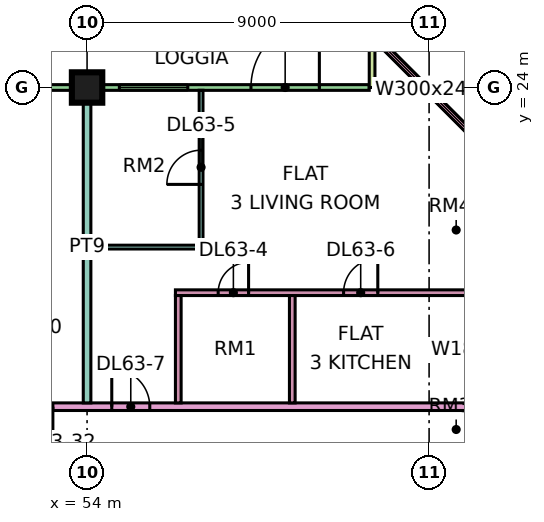
"""IFC4 building model, lengths in metres.
Left out: names, types, materials, properties, quantities, classifications, styles, units other than length and angle.
Written with IfcOpenShell. Run it as: python <this file> out.ifc"""

import sys

from ifc_helpers import new_model, si_unit, direction, frame, frame_2d, origin, origin_2d, place, context, subcontext, project, spatial, rectangle, extrude, element, fill, save


model = new_model("IFC4")
c1 = context("Model", 3, precision=1e-05, world=origin(), true_north=direction((0.0, 1.0)))
c2 = subcontext(c1, "Body", "Model", "MODEL_VIEW")
j1 = project(units=[si_unit("LENGTHUNIT", "METRE"), si_unit("PLANEANGLEUNIT", "RADIAN")], contexts=[c1])
p1 = place(None, origin())
s1 = spatial("IfcSite", under=j1, at=p1, CompositionType="ELEMENT")
p2 = place(p1, origin())
s2 = spatial("IfcBuilding", under=s1, at=p2, CompositionType="ELEMENT")
p3 = place(p2, frame((0.0, 0.0, 273.4)))
s3 = spatial("IfcBuildingStorey", under=s2, at=p3, CompositionType="ELEMENT", Elevation=273.4)
p4 = place(p3, frame((54.0, 24.0, 0.0), z_axis=(0.0, 0.0, 1.0), x_axis=(1.0, 0.0, 0.0)))
e1 = element("IfcColumn", 1, at=p4, inside=s3, PredefinedType="COLUMN", context=c2, shape_type="SweptSolid", body=[
    extrude(rectangle(XDim=0.8, YDim=0.8, at=origin_2d()), origin(), (0.0, 0.0, 1.0), 3.75),
])
p5 = place(p3, frame((61.425, 24.0, 0.0), z_axis=(0.0, 0.0, 1.0), x_axis=(-1.0, 0.0, 0.0)))
e2 = element("IfcWall", 2, at=p5, inside=s3, PredefinedType="SOLIDWALL", context=c2, shape_type="SweptSolid", body=[
    extrude(rectangle(XDim=13.35, YDim=0.15, at=frame_2d((6.675, 0.0))), origin(), (0.0, 0.0, 1.0), 3.35),
])
p6 = place(p5, frame((1.312, 0.0, 0.0)))
e3 = element("IfcOpeningElement", 3, at=p6, cuts=e2, PredefinedType="OPENING", context=c2, shape_type="SweptSolid", body=[
    extrude(rectangle(XDim=1.8, YDim=2.4, at=frame_2d((0.9, 1.2))), frame((0.0, 0.085, 0.0), z_axis=(0.0, -1.0, 0.0), x_axis=(1.0, 0.0, 0.0)), (0.0, 0.0, 1.0), 0.17),
])
p7 = place(p5, frame((4.775, 0.0, 0.45)))
e4 = element("IfcOpeningElement", 4, at=p7, cuts=e2, PredefinedType="OPENING", context=c2, shape_type="SweptSolid", body=[
    extrude(rectangle(XDim=1.8, YDim=2.4, at=frame_2d((0.9, 1.2))), frame((0.0, 0.085, 0.0), z_axis=(0.0, -1.0, 0.0), x_axis=(1.0, 0.0, 0.0)), (0.0, 0.0, 1.0), 0.17),
])
p8 = place(p5, frame((8.538, 0.0, 0.45)))
e5 = element("IfcOpeningElement", 5, at=p8, cuts=e2, PredefinedType="OPENING", context=c2, shape_type="SweptSolid", body=[
    extrude(rectangle(XDim=4.2, YDim=2.4, at=frame_2d((2.1, 1.2))), frame((0.0, 0.085, 0.0), z_axis=(0.0, -1.0, 0.0), x_axis=(1.0, 0.0, 0.0)), (0.0, 0.0, 1.0), 0.17),
])
p9 = place(p3, frame((61.5, 25.5, 0.0), z_axis=(0.0, 0.0, 1.0), x_axis=(0.0, -1.0, 0.0)))
e6 = element("IfcWall", 6, at=p9, inside=s3, PredefinedType="SOLIDWALL", context=c2, shape_type="SweptSolid", body=[
    extrude(rectangle(XDim=1.5, YDim=0.15, at=frame_2d((0.75, 0.0))), origin(), (0.0, 0.0, 1.0), 3.35),
])
p10 = place(p3, frame((64.447, 22.447, 0.0), z_axis=(0.0, 0.0, 1.0), x_axis=(-0.707106781187, 0.707106781187, 0.0)))
e7 = element("IfcWall", 7, at=p10, inside=s3, PredefinedType="SOLIDWALL", context=c2, shape_type="SweptSolid", body=[
    extrude(rectangle(XDim=4.243, YDim=0.15, at=frame_2d((2.121, 0.0))), origin(), (0.0, 0.0, 1.0), 3.35),
])
p11 = place(p10, frame((0.621, 0.0, 0.45)))
e8 = element("IfcOpeningElement", 8, at=p11, cuts=e7, PredefinedType="OPENING", context=c2, shape_type="SweptSolid", body=[
    extrude(rectangle(XDim=3.0, YDim=2.4, at=frame_2d((1.5, 1.2))), frame((0.0, 0.085, 0.0), z_axis=(0.0, -1.0, 0.0), x_axis=(1.0, 0.0, 0.0)), (0.0, 0.0, 1.0), 0.17),
])
p12 = place(p3, frame((51.225, 15.6, 0.0), z_axis=(0.0, 0.0, 1.0), x_axis=(1.0, 0.0, 0.0)))
e9 = element("IfcWall", 9, at=p12, inside=s3, PredefinedType="PARTITIONING", context=c2, shape_type="SweptSolid", body=[
    extrude(rectangle(XDim=13.125, YDim=0.2, at=frame_2d((6.562, 0.0))), origin(), (0.0, 0.0, 1.0), 3.35),
])
p13 = place(p12, frame((3.425, 0.0, 0.0)))
e10 = element("IfcOpeningElement", 10, at=p13, cuts=e9, PredefinedType="OPENING", context=c2, shape_type="SweptSolid", body=[
    extrude(rectangle(XDim=1.0, YDim=2.1, at=frame_2d((0.5, 1.05))), frame((0.0, 0.11, 0.0), z_axis=(0.0, -1.0, 0.0), x_axis=(1.0, 0.0, 0.0)), (0.0, 0.0, 1.0), 0.22),
])
p14 = place(p12, frame((0.875, 0.0, 0.0)))
e11 = element("IfcOpeningElement", 11, at=p14, cuts=e9, PredefinedType="OPENING", context=c2, shape_type="SweptSolid", body=[
    extrude(rectangle(XDim=1.0, YDim=2.1, at=frame_2d((0.5, 1.05))), frame((0.0, 0.11, 0.0), z_axis=(0.0, -1.0, 0.0), x_axis=(1.0, 0.0, 0.0)), (0.0, 0.0, 1.0), 0.22),
])
p15 = place(p3, frame((54.0, 15.7, 0.0), z_axis=(0.0, 0.0, 1.0), x_axis=(0.0, 1.0, 0.0)))
e12 = element("IfcWall", 12, at=p15, inside=s3, PredefinedType="PARTITIONING", context=c2, shape_type="SweptSolid", body=[
    extrude(rectangle(XDim=8.226, YDim=0.2, at=frame_2d((4.113, 0.0))), origin(), (0.0, 0.0, 1.0), 3.35),
])
p16 = place(p3, frame((54.1, 19.8, 0.0), z_axis=(0.0, 0.0, 1.0), x_axis=(1.0, 0.0, 0.0)))
e13 = element("IfcWall", 13, at=p16, inside=s3, PredefinedType="PARTITIONING", context=c2, shape_type="SweptSolid", body=[
    extrude(rectangle(XDim=2.85, YDim=0.1, at=frame_2d((1.425, 0.0))), origin(), (0.0, 0.0, 1.0), 3.35),
])
p17 = place(p3, frame((56.325, 18.6, 0.0), z_axis=(0.0, 0.0, 1.0), x_axis=(1.0, 0.0, 0.0)))
e14 = element("IfcWall", 14, at=p17, inside=s3, PredefinedType="PARTITIONING", context=c2, shape_type="SweptSolid", body=[
    extrude(rectangle(XDim=8.025, YDim=0.15, at=frame_2d((4.013, 0.0))), origin(), (0.0, 0.0, 1.0), 3.35),
])
p18 = place(p17, frame((1.125, 0.0, 0.0)))
e15 = element("IfcOpeningElement", 15, at=p18, cuts=e14, PredefinedType="OPENING", context=c2, shape_type="SweptSolid", body=[
    extrude(rectangle(XDim=0.8, YDim=2.1, at=frame_2d((0.4, 1.05))), frame((0.0, 0.085, 0.0), z_axis=(0.0, -1.0, 0.0), x_axis=(1.0, 0.0, 0.0)), (0.0, 0.0, 1.0), 0.17),
])
p19 = place(p17, frame((4.425, 0.0, 0.0)))
e16 = element("IfcOpeningElement", 16, at=p19, cuts=e14, PredefinedType="OPENING", context=c2, shape_type="SweptSolid", body=[
    extrude(rectangle(XDim=0.9, YDim=2.1, at=frame_2d((0.45, 1.05))), frame((0.0, 0.085, 0.0), z_axis=(0.0, -1.0, 0.0), x_axis=(1.0, 0.0, 0.0)), (0.0, 0.0, 1.0), 0.17),
])
p20 = place(p3, frame((56.4, 15.7, 0.0), z_axis=(0.0, 0.0, 1.0), x_axis=(0.0, 1.0, 0.0)))
e17 = element("IfcWall", 17, at=p20, inside=s3, PredefinedType="PARTITIONING", context=c2, shape_type="SweptSolid", body=[
    extrude(rectangle(XDim=2.825, YDim=0.15, at=frame_2d((1.413, 0.0))), origin(), (0.0, 0.0, 1.0), 3.35),
])
p21 = place(p3, frame((57.0, 19.75, 0.0), z_axis=(0.0, 0.0, 1.0), x_axis=(0.0, 1.0, 0.0)))
e18 = element("IfcWall", 18, at=p21, inside=s3, PredefinedType="PARTITIONING", context=c2, shape_type="SweptSolid", body=[
    extrude(rectangle(XDim=4.176, YDim=0.1, at=frame_2d((2.088, 0.0))), origin(), (0.0, 0.0, 1.0), 3.35),
])
p22 = place(p21, frame((1.7, 0.0, 0.0)))
e19 = element("IfcOpeningElement", 19, at=p22, cuts=e18, PredefinedType="OPENING", context=c2, shape_type="SweptSolid", body=[
    extrude(rectangle(XDim=0.9, YDim=2.1, at=frame_2d((0.45, 1.05))), frame((0.0, 0.06, 0.0), z_axis=(0.0, -1.0, 0.0), x_axis=(1.0, 0.0, 0.0)), (0.0, 0.0, 1.0), 0.12),
])
p23 = place(p3, frame((59.4, 15.7, 0.0), z_axis=(0.0, 0.0, 1.0), x_axis=(0.0, 1.0, 0.0)))
e20 = element("IfcWall", 20, at=p23, inside=s3, PredefinedType="PARTITIONING", context=c2, shape_type="SweptSolid", body=[
    extrude(rectangle(XDim=2.825, YDim=0.15, at=frame_2d((1.413, 0.0))), origin(), (0.0, 0.0, 1.0), 3.35),
])
p24 = place(p6, frame((1.8, 0.0, 0.0), z_axis=(0.0, 0.0, 1.0), x_axis=(-1.0, 0.0, 0.0)))
e21 = element("IfcDoor", 21, at=p24, inside=s3, OperationType="DOUBLE_DOOR_SINGLE_SWING", PredefinedType="DOOR", context=c2, shape_type="SweptSolid", body=[
    extrude(rectangle(XDim=1.8, YDim=2.4, at=frame_2d((0.9, 1.2))), frame((0.0, 0.025, 0.0), z_axis=(0.0, -1.0, 0.0), x_axis=(1.0, 0.0, 0.0)), (0.0, 0.0, 1.0), 0.05),
])
fill(e3, e21)
p25 = place(p7, origin())
e22 = element("IfcWindow", 22, at=p25, inside=s3, PartitioningType="SINGLE_PANEL", PredefinedType="WINDOW", context=c2, shape_type="SweptSolid", body=[
    extrude(rectangle(XDim=1.8, YDim=2.4, at=frame_2d((0.9, 1.2))), frame((0.0, 0.03, 0.0), z_axis=(0.0, -1.0, 0.0), x_axis=(1.0, 0.0, 0.0)), (0.0, 0.0, 1.0), 0.06),
])
fill(e4, e22)
p26 = place(p11, origin())
e23 = element("IfcWindow", 23, at=p26, inside=s3, PartitioningType="SINGLE_PANEL", PredefinedType="WINDOW", context=c2, shape_type="SweptSolid", body=[
    extrude(rectangle(XDim=3.0, YDim=2.4, at=frame_2d((1.5, 1.2))), frame((0.0, 0.03, 0.0), z_axis=(0.0, -1.0, 0.0), x_axis=(1.0, 0.0, 0.0)), (0.0, 0.0, 1.0), 0.06),
])
fill(e8, e23)
p27 = place(p18, frame((0.8, 0.0, 0.0), z_axis=(0.0, 0.0, 1.0), x_axis=(-1.0, 0.0, 0.0)))
e24 = element("IfcDoor", 24, at=p27, inside=s3, OperationType="SINGLE_SWING_RIGHT", PredefinedType="DOOR", context=c2, shape_type="SweptSolid", body=[
    extrude(rectangle(XDim=0.8, YDim=2.1, at=frame_2d((0.4, 1.05))), frame((0.0, 0.025, 0.0), z_axis=(0.0, -1.0, 0.0), x_axis=(1.0, 0.0, 0.0)), (0.0, 0.0, 1.0), 0.05),
])
fill(e15, e24)
p28 = place(p22, origin())
e25 = element("IfcDoor", 25, at=p28, inside=s3, OperationType="SINGLE_SWING_LEFT", PredefinedType="DOOR", context=c2, shape_type="SweptSolid", body=[
    extrude(rectangle(XDim=0.9, YDim=2.1, at=frame_2d((0.45, 1.05))), frame((0.0, 0.025, 0.0), z_axis=(0.0, -1.0, 0.0), x_axis=(1.0, 0.0, 0.0)), (0.0, 0.0, 1.0), 0.05),
])
fill(e19, e25)
p29 = place(p19, frame((0.9, 0.0, 0.0), z_axis=(0.0, 0.0, 1.0), x_axis=(-1.0, 0.0, 0.0)))
e26 = element("IfcDoor", 26, at=p29, inside=s3, OperationType="SINGLE_SWING_RIGHT", PredefinedType="DOOR", context=c2, shape_type="SweptSolid", body=[
    extrude(rectangle(XDim=0.9, YDim=2.1, at=frame_2d((0.45, 1.05))), frame((0.0, 0.025, 0.0), z_axis=(0.0, -1.0, 0.0), x_axis=(1.0, 0.0, 0.0)), (0.0, 0.0, 1.0), 0.05),
])
fill(e16, e26)
p30 = place(p13, origin())
e27 = element("IfcDoor", 27, at=p30, inside=s3, OperationType="SINGLE_SWING_LEFT", PredefinedType="DOOR", context=c2, shape_type="SweptSolid", body=[
    extrude(rectangle(XDim=1.0, YDim=2.1, at=frame_2d((0.5, 1.05))), frame((0.0, 0.025, 0.0), z_axis=(0.0, -1.0, 0.0), x_axis=(1.0, 0.0, 0.0)), (0.0, 0.0, 1.0), 0.05),
])
fill(e10, e27)
p31 = place(p14, origin())
e28 = element("IfcDoor", 28, at=p31, inside=s3, OperationType="SINGLE_SWING_RIGHT", PredefinedType="DOOR", context=c2, shape_type="SweptSolid", body=[
    extrude(rectangle(XDim=1.0, YDim=2.1, at=frame_2d((0.5, 1.05))), frame((0.0, 0.025, 0.0), z_axis=(0.0, -1.0, 0.0), x_axis=(1.0, 0.0, 0.0)), (0.0, 0.0, 1.0), 0.05),
])
fill(e11, e28)
save(model, sys.argv[1])
